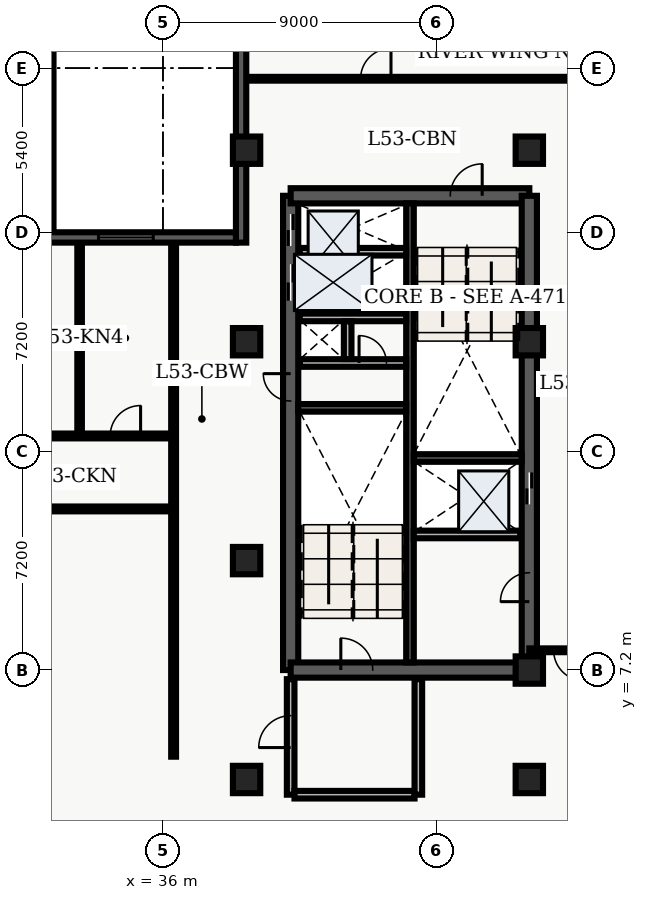
"""IFC4 building model, lengths in metres.
Left out: names, types, materials, properties, quantities, classifications, styles, units other than length and angle.
Written with IfcOpenShell. Run it as: python <this file> out.ifc"""

import sys

from ifc_helpers import new_model, entity, si_unit, converted_unit, direction, frame, origin_with_axes, origin_2d_with_axis, place, context, subcontext, project, spatial, polyline, rectangle, outline, extrude, element, fill, save


model = new_model("IFC4")
c1 = context("Model", 3, precision=1e-05, world=origin_with_axes(), true_north=direction((0.0, 1.0)))
c2 = subcontext(c1, "Body", "Model", "MODEL_VIEW")
j1 = project(units=[si_unit("LENGTHUNIT", "METRE"), converted_unit("PLANEANGLEUNIT", "DEGREE", entity("IfcPlaneAngleMeasure", 0.017), si_unit("PLANEANGLEUNIT", "RADIAN"), dimensions=[0, 0, 0, 0, 0, 0, 0])], contexts=[c1])
p1 = place(None, origin_with_axes())
s1 = spatial("IfcSite", under=j1, at=p1, CompositionType="ELEMENT")
p2 = place(p1, origin_with_axes())
s2 = spatial("IfcBuilding", under=s1, at=p2, CompositionType="ELEMENT")
p3 = place(p2, frame((0.0, 0.0, 216.0), z_axis=(0.0, 0.0, 1.0), x_axis=(1.0, 0.0, 0.0)))
s3 = spatial("IfcBuildingStorey", under=s2, at=p3, CompositionType="ELEMENT", Elevation=216.0)
p4 = place(p3, frame((40.2, 7.2, 0.0), z_axis=(0.0, 0.0, 1.0), x_axis=(0.0, 1.0, 0.0)))
e1 = element("IfcWall", 1, at=p4, inside=s3, PredefinedType="SHEAR", context=c2, shape_type="SweptSolid", body=[
    extrude(outline(polyline([(0.0, -0.25), (15.6, -0.25), (15.6, 0.25), (0.0, 0.25), (0.0, -0.25)])), origin_with_axes(), (0.0, 0.0, 1.0), 3.6),
])
p5 = place(p4, frame((14.475, 0.0, 0.0), z_axis=(0.0, 0.0, 1.0), x_axis=(1.0, 0.0, 0.0)))
e2 = element("IfcOpeningElement", 2, at=p5, cuts=e1, PredefinedType="OPENING", context=c2, shape_type="SweptSolid", body=[
    extrude(rectangle(XDim=1.05, YDim=0.52, at=origin_2d_with_axis()), origin_with_axes(), (0.0, 0.0, 1.0), 2.15),
])
p6 = place(p4, frame((12.75, 0.0, 0.0), z_axis=(0.0, 0.0, 1.0), x_axis=(1.0, 0.0, 0.0)))
e3 = element("IfcOpeningElement", 3, at=p6, cuts=e1, PredefinedType="OPENING", context=c2, shape_type="SweptSolid", body=[
    extrude(rectangle(XDim=1.2, YDim=0.52, at=origin_2d_with_axis()), origin_with_axes(), (0.0, 0.0, 1.0), 2.15),
])
p7 = place(p4, frame((9.3, 0.0, 0.0), z_axis=(0.0, 0.0, 1.0), x_axis=(1.0, 0.0, 0.0)))
e4 = element("IfcOpeningElement", 4, at=p7, cuts=e1, PredefinedType="OPENING", context=c2, shape_type="SweptSolid", body=[
    extrude(rectangle(XDim=0.9, YDim=0.52, at=origin_2d_with_axis()), origin_with_axes(), (0.0, 0.0, 1.0), 2.15),
])
p8 = place(p3, frame((40.2, 7.2, 0.0), z_axis=(0.0, 0.0, 1.0), x_axis=(1.0, 0.0, 0.0)))
e5 = element("IfcWall", 5, at=p8, inside=s3, PredefinedType="SHEAR", context=c2, shape_type="SweptSolid", body=[
    extrude(outline(polyline([(0.0, -0.25), (7.85, -0.25), (7.85, 0.25), (0.0, 0.25), (0.0, -0.25)])), origin_with_axes(), (0.0, 0.0, 1.0), 3.6),
])
p9 = place(p8, frame((2.175, 0.0, 0.0), z_axis=(0.0, 0.0, 1.0), x_axis=(1.0, 0.0, 0.0)))
e6 = element("IfcOpeningElement", 6, at=p9, cuts=e5, PredefinedType="OPENING", context=c2, shape_type="SweptSolid", body=[
    extrude(rectangle(XDim=1.05, YDim=0.52, at=origin_2d_with_axis()), origin_with_axes(), (0.0, 0.0, 1.0), 2.15),
])
p10 = place(p3, frame((40.2, 22.8, 0.0), z_axis=(0.0, 0.0, 1.0), x_axis=(1.0, 0.0, 0.0)))
e7 = element("IfcWall", 7, at=p10, inside=s3, PredefinedType="SHEAR", context=c2, shape_type="SweptSolid", body=[
    extrude(outline(polyline([(0.0, -0.25), (7.85, -0.25), (7.85, 0.25), (0.0, 0.25), (0.0, -0.25)])), origin_with_axes(), (0.0, 0.0, 1.0), 3.6),
])
p11 = place(p10, frame((5.775, 0.0, 0.0), z_axis=(0.0, 0.0, 1.0), x_axis=(1.0, 0.0, 0.0)))
e8 = element("IfcOpeningElement", 8, at=p11, cuts=e7, PredefinedType="OPENING", context=c2, shape_type="SweptSolid", body=[
    extrude(rectangle(XDim=1.05, YDim=0.52, at=origin_2d_with_axis()), origin_with_axes(), (0.0, 0.0, 1.0), 2.15),
])
p12 = place(p3, frame((48.05, 7.2, 0.0), z_axis=(0.0, 0.0, 1.0), x_axis=(0.0, 1.0, 0.0)))
e9 = element("IfcWall", 9, at=p12, inside=s3, PredefinedType="SHEAR", context=c2, shape_type="SweptSolid", body=[
    extrude(outline(polyline([(0.0, -0.25), (15.6, -0.25), (15.6, 0.25), (0.0, 0.25), (0.0, -0.25)])), origin_with_axes(), (0.0, 0.0, 1.0), 3.6),
])
p13 = place(p12, frame((5.975, 0.0, 0.0), z_axis=(0.0, 0.0, 1.0), x_axis=(1.0, 0.0, 0.0)))
e10 = element("IfcOpeningElement", 10, at=p13, cuts=e9, PredefinedType="OPENING", context=c2, shape_type="SweptSolid", body=[
    extrude(rectangle(XDim=1.05, YDim=0.52, at=origin_2d_with_axis()), origin_with_axes(), (0.0, 0.0, 1.0), 2.15),
])
p14 = place(p12, frame((2.725, 0.0, 0.0), z_axis=(0.0, 0.0, 1.0), x_axis=(1.0, 0.0, 0.0)))
e11 = element("IfcOpeningElement", 11, at=p14, cuts=e9, PredefinedType="OPENING", context=c2, shape_type="SweptSolid", body=[
    extrude(rectangle(XDim=0.95, YDim=0.52, at=origin_2d_with_axis()), origin_with_axes(), (0.0, 0.0, 1.0), 2.15),
])
p15 = place(p3, frame((44.125, 7.45, 0.0), z_axis=(0.0, 0.0, 1.0), x_axis=(0.0, 1.0, 0.0)))
e12 = element("IfcWall", 12, at=p15, inside=s3, PredefinedType="SHEAR", context=c2, shape_type="SweptSolid", body=[
    extrude(outline(polyline([(0.0, -0.125), (15.1, -0.125), (15.1, 0.125), (0.0, 0.125), (0.0, -0.125)])), origin_with_axes(), (0.0, 0.0, 1.0), 3.6),
])
for number, where, z_axis, x_axis in (
    (13, (40.45, 15.825, 0.0), (0.0, 0.0, 1.0), (1.0, 0.0, 0.0)),
    (14, (44.25, 14.175, 0.0), (0.0, 0.0, 1.0), (1.0, 0.0, 0.0)),
):
    element("IfcWall", number, at=place(p3, frame(where, z_axis=z_axis, x_axis=x_axis)), inside=s3, PredefinedType="SHEAR", context=c2, shape_type="SweptSolid", body=[
        extrude(outline(polyline([(0.0, -0.125), (3.55, -0.125), (3.55, 0.125), (0.0, 0.125), (0.0, -0.125)])), origin_with_axes(), (0.0, 0.0, 1.0), 3.6),
    ])
p16 = place(p3, frame((40.5, 17.3, 0.0), z_axis=(0.0, 0.0, 1.0), x_axis=(1.0, 0.0, 0.0)))
e15 = element("IfcWall", 15, at=p16, inside=s3, PredefinedType="SOLIDWALL", context=c2, shape_type="SweptSolid", body=[
    extrude(outline(polyline([(0.0, -0.125), (3.5, -0.125), (3.5, 0.125), (0.0, 0.125), (0.0, -0.125)])), origin_with_axes(), (0.0, 0.0, 1.0), 2.64),
])
p17 = place(p16, frame((2.4, 0.0, 0.0), z_axis=(0.0, 0.0, 1.0), x_axis=(1.0, 0.0, 0.0)))
e16 = element("IfcOpeningElement", 16, at=p17, cuts=e15, PredefinedType="OPENING", context=c2, shape_type="SweptSolid", body=[
    extrude(rectangle(XDim=0.9, YDim=0.27, at=origin_2d_with_axis()), origin_with_axes(), (0.0, 0.0, 1.0), 2.15),
])
p18 = place(p3, frame((40.5, 18.8, 0.0), z_axis=(0.0, 0.0, 1.0), x_axis=(1.0, 0.0, 0.0)))
e17 = element("IfcWall", 17, at=p18, inside=s3, PredefinedType="SOLIDWALL", context=c2, shape_type="SweptSolid", body=[
    extrude(outline(polyline([(0.0, -0.125), (3.5, -0.125), (3.5, 0.125), (0.0, 0.125), (0.0, -0.125)])), origin_with_axes(), (0.0, 0.0, 1.0), 2.64),
])
p19 = place(p3, frame((42.075, 17.43, 0.0), z_axis=(0.0, 0.0, 1.0), x_axis=(0.0, 1.0, 0.0)))
e18 = element("IfcWall", 18, at=p19, inside=s3, PredefinedType="SOLIDWALL", context=c2, shape_type="SweptSolid", body=[
    extrude(outline(polyline([(0.0, -0.125), (1.24, -0.125), (1.24, 0.125), (0.0, 0.125), (0.0, -0.125)])), origin_with_axes(), (0.0, 0.0, 1.0), 2.64),
])
p20 = place(p3, frame((40.2, 3.1, 0.0), z_axis=(0.0, 0.0, 1.0), x_axis=(0.0, 1.0, 0.0)))
e19 = element("IfcWall", 19, at=p20, inside=s3, PredefinedType="SOLIDWALL", context=c2, shape_type="SweptSolid", body=[
    extrude(outline(polyline([(0.0, -0.125), (3.8, -0.125), (3.8, 0.125), (0.0, 0.125), (0.0, -0.125)])), origin_with_axes(), (0.0, 0.0, 1.0), 2.64),
])
p21 = place(p20, frame((2.075, 0.0, 0.0), z_axis=(0.0, 0.0, 1.0), x_axis=(1.0, 0.0, 0.0)))
e20 = element("IfcOpeningElement", 20, at=p21, cuts=e19, PredefinedType="OPENING", context=c2, shape_type="SweptSolid", body=[
    extrude(rectangle(XDim=1.05, YDim=0.27, at=origin_2d_with_axis()), origin_with_axes(), (0.0, 0.0, 1.0), 2.15),
])
p22 = place(p3, frame((40.325, 3.1, 0.0), z_axis=(0.0, 0.0, 1.0), x_axis=(1.0, 0.0, 0.0)))
e21 = element("IfcWall", 21, at=p22, inside=s3, PredefinedType="SOLIDWALL", context=c2, shape_type="SweptSolid", body=[
    extrude(outline(polyline([(0.0, -0.125), (3.95, -0.125), (3.95, 0.125), (0.0, 0.125), (0.0, -0.125)])), origin_with_axes(), (0.0, 0.0, 1.0), 2.64),
])
p23 = place(p3, frame((44.4, 3.1, 0.0), z_axis=(0.0, 0.0, 1.0), x_axis=(0.0, 1.0, 0.0)))
e22 = element("IfcWall", 22, at=p23, inside=s3, PredefinedType="SOLIDWALL", context=c2, shape_type="SweptSolid", body=[
    extrude(outline(polyline([(0.0, -0.125), (3.8, -0.125), (3.8, 0.125), (0.0, 0.125), (0.0, -0.125)])), origin_with_axes(), (0.0, 0.0, 1.0), 2.64),
])
for number, where, z_axis, x_axis in (
    (23, (38.75, 3.6, 0.0), (0.0, 0.0, 1.0), (1.0, 0.0, 0.0)),
    (24, (38.75, 10.8, 0.0), (0.0, 0.0, 1.0), (1.0, 0.0, 0.0)),
    (25, (38.75, 18.0, 0.0), (0.0, 0.0, 1.0), (1.0, 0.0, 0.0)),
    (26, (38.75, 24.3, 0.0), (0.0, 0.0, 1.0), (1.0, 0.0, 0.0)),
    (27, (48.05, 3.6, 0.0), (0.0, 0.0, 1.0), (1.0, 0.0, 0.0)),
    (28, (48.05, 7.2, 0.0), (0.0, 0.0, 1.0), (1.0, 0.0, 0.0)),
    (29, (48.05, 18.0, 0.0), (0.0, 0.0, 1.0), (1.0, 0.0, 0.0)),
    (30, (48.05, 24.3, 0.0), (0.0, 0.0, 1.0), (1.0, 0.0, 0.0)),
):
    element("IfcColumn", number, at=place(p3, frame(where, z_axis=z_axis, x_axis=x_axis)), inside=s3, PredefinedType="COLUMN", context=c2, shape_type="SweptSolid", body=[
        extrude(rectangle(XDim=0.9, YDim=0.9, at=origin_2d_with_axis()), origin_with_axes(), (0.0, 0.0, 1.0), 3.9),
    ])
for number, where, z_axis, x_axis in (
    (31, (40.5, 20.96, 0.0), (0.0, 0.0, 1.0), (1.0, 0.0, 0.0)),
    (32, (44.25, 11.66, 0.0), (0.0, 0.0, 1.0), (1.0, 0.0, 0.0)),
):
    element("IfcWall", number, at=place(p3, frame(where, z_axis=z_axis, x_axis=x_axis)), inside=s3, PredefinedType="SOLIDWALL", context=c2, shape_type="SweptSolid", body=[
        extrude(outline(polyline([(0.0, -0.125), (3.5, -0.125), (3.5, 0.125), (0.0, 0.125), (0.0, -0.125)])), origin_with_axes(), (0.0, 0.0, 1.0), 2.64),
    ])
p24 = place(p3, frame((21.15, 12.5, 0.0), z_axis=(0.0, 0.0, 1.0), x_axis=(1.0, 0.0, 0.0)))
e33 = element("IfcWall", 33, at=p24, inside=s3, PredefinedType="PARTITIONING", context=c2, shape_type="SweptSolid", body=[
    extrude(outline(polyline([(0.0, -0.08), (15.2, -0.08), (15.2, 0.08), (0.0, 0.08), (0.0, -0.08)])), origin_with_axes(), (0.0, 0.0, 1.0), 2.64),
])
p25 = place(p24, frame((7.65, 0.0, 0.0), z_axis=(0.0, 0.0, 1.0), x_axis=(1.0, 0.0, 0.0)))
e34 = element("IfcOpeningElement", 34, at=p25, cuts=e33, PredefinedType="OPENING", context=c2, shape_type="SweptSolid", body=[
    extrude(rectangle(XDim=1.2, YDim=0.18, at=origin_2d_with_axis()), origin_with_axes(), (0.0, 0.0, 1.0), 2.2),
])
p26 = place(p3, frame((21.15, 14.9, 0.0), z_axis=(0.0, 0.0, 1.0), x_axis=(1.0, 0.0, 0.0)))
e35 = element("IfcWall", 35, at=p26, inside=s3, PredefinedType="PARTITIONING", context=c2, shape_type="SweptSolid", body=[
    extrude(outline(polyline([(0.0, -0.08), (15.2, -0.08), (15.2, 0.08), (0.0, 0.08), (0.0, -0.08)])), origin_with_axes(), (0.0, 0.0, 1.0), 2.64),
])
p27 = place(p26, frame((1.964, 0.0, 0.0), z_axis=(0.0, 0.0, 1.0), x_axis=(1.0, 0.0, 0.0)))
e36 = element("IfcOpeningElement", 36, at=p27, cuts=e35, PredefinedType="OPENING", context=c2, shape_type="SweptSolid", body=[
    extrude(rectangle(XDim=1.0, YDim=0.18, at=origin_2d_with_axis()), origin_with_axes(), (0.0, 0.0, 1.0), 2.15),
])
p28 = place(p26, frame((5.099, 0.0, 0.0), z_axis=(0.0, 0.0, 1.0), x_axis=(1.0, 0.0, 0.0)))
e37 = element("IfcOpeningElement", 37, at=p28, cuts=e35, PredefinedType="OPENING", context=c2, shape_type="SweptSolid", body=[
    extrude(rectangle(XDim=1.0, YDim=0.18, at=origin_2d_with_axis()), origin_with_axes(), (0.0, 0.0, 1.0), 2.15),
])
p29 = place(p26, frame((9.279, 0.0, 0.0), z_axis=(0.0, 0.0, 1.0), x_axis=(1.0, 0.0, 0.0)))
e38 = element("IfcOpeningElement", 38, at=p29, cuts=e35, PredefinedType="OPENING", context=c2, shape_type="SweptSolid", body=[
    extrude(rectangle(XDim=1.0, YDim=0.18, at=origin_2d_with_axis()), origin_with_axes(), (0.0, 0.0, 1.0), 2.15),
])
p30 = place(p26, frame((13.614, 0.0, 0.0), z_axis=(0.0, 0.0, 1.0), x_axis=(1.0, 0.0, 0.0)))
e39 = element("IfcOpeningElement", 39, at=p30, cuts=e35, PredefinedType="OPENING", context=c2, shape_type="SweptSolid", body=[
    extrude(rectangle(XDim=1.0, YDim=0.18, at=origin_2d_with_axis()), origin_with_axes(), (0.0, 0.0, 1.0), 2.15),
])
p31 = place(p3, frame((36.35, 4.35, 0.0), z_axis=(0.0, 0.0, 1.0), x_axis=(0.0, 1.0, 0.0)))
e40 = element("IfcWall", 40, at=p31, inside=s3, PredefinedType="PARTITIONING", context=c2, shape_type="SweptSolid", body=[
    extrude(outline(polyline([(0.0, -0.08), (16.95, -0.08), (16.95, 0.08), (0.0, 0.08), (0.0, -0.08)])), origin_with_axes(), (0.0, 0.0, 1.0), 2.64),
])
p32 = place(p3, frame((33.258, 15.02, 0.0), z_axis=(0.0, 0.0, 1.0), x_axis=(0.0, 1.0, 0.0)))
e41 = element("IfcWall", 41, at=p32, inside=s3, PredefinedType="PARTITIONING", context=c2, shape_type="SweptSolid", body=[
    extrude(outline(polyline([(0.0, -0.075), (6.245, -0.075), (6.245, 0.075), (0.0, 0.075), (0.0, -0.075)])), origin_with_axes(), (0.0, 0.0, 1.0), 2.64),
])
p33 = place(p3, frame((59.665, 7.85, 0.0), z_axis=(0.0, 0.0, 1.0), x_axis=(-1.0, 0.0, 0.0)))
e42 = element("IfcWall", 42, at=p33, inside=s3, PredefinedType="PARTITIONING", context=c2, shape_type="SweptSolid", body=[
    extrude(outline(polyline([(0.0, -0.062), (11.615, -0.062), (11.615, 0.062), (0.0, 0.062), (0.0, -0.062)])), origin_with_axes(), (0.0, 0.0, 1.0), 2.64),
])
p34 = place(p33, frame((10.315, 0.0, 0.0), z_axis=(0.0, 0.0, 1.0), x_axis=(1.0, 0.0, 0.0)))
e43 = element("IfcOpeningElement", 43, at=p34, cuts=e42, PredefinedType="OPENING", context=c2, shape_type="SweptSolid", body=[
    extrude(rectangle(XDim=1.0, YDim=0.145, at=origin_2d_with_axis()), origin_with_axes(), (0.0, 0.0, 1.0), 2.15),
])
p35 = place(p3, frame((38.735, 26.65, 0.0), z_axis=(0.0, 0.0, 1.0), x_axis=(1.0, 0.0, 0.0)))
e44 = element("IfcWall", 44, at=p35, inside=s3, PredefinedType="PARTITIONING", context=c2, shape_type="SweptSolid", body=[
    extrude(outline(polyline([(0.0, -0.062), (20.905, -0.062), (20.905, 0.062), (0.0, 0.062), (0.0, -0.062)])), origin_with_axes(), (0.0, 0.0, 1.0), 2.64),
])
p36 = place(p35, frame((4.265, 0.0, 0.0), z_axis=(0.0, 0.0, 1.0), x_axis=(1.0, 0.0, 0.0)))
e45 = element("IfcOpeningElement", 45, at=p36, cuts=e44, PredefinedType="OPENING", context=c2, shape_type="SweptSolid", body=[
    extrude(rectangle(XDim=1.0, YDim=0.145, at=origin_2d_with_axis()), origin_with_axes(), (0.0, 0.0, 1.0), 2.15),
])
p37 = place(p3, frame((38.57, 21.26, 0.0), z_axis=(0.0, 0.0, 1.0), x_axis=(0.0, 1.0, 0.0)))
e46 = element("IfcWall", 46, at=p37, inside=s3, PredefinedType="SOLIDWALL", context=c2, shape_type="SweptSolid", body=[
    extrude(outline(polyline([(0.0, -0.17), (7.54, -0.17), (7.54, 0.17), (0.0, 0.17), (0.0, -0.17)])), origin_with_axes(), (0.0, 0.0, 1.0), 3.6),
])
p38 = place(p3, frame((32.23, 41.22, 0.0), z_axis=(0.0, 0.0, 1.0), x_axis=(0.0, -1.0, 0.0)))
e47 = element("IfcWall", 47, at=p38, inside=s3, PredefinedType="SOLIDWALL", context=c2, shape_type="SweptSolid", body=[
    extrude(outline(polyline([(0.0, -0.17), (19.62, -0.17), (19.62, 0.17), (0.0, 0.17), (0.0, -0.17)])), origin_with_axes(), (0.0, 0.0, 1.0), 3.6),
])
p39 = place(p38, frame((2.903, 0.0, 0.45), z_axis=(0.0, 0.0, 1.0), x_axis=(1.0, 0.0, 0.0)))
e48 = element("IfcOpeningElement", 48, at=p39, cuts=e47, PredefinedType="OPENING", context=c2, shape_type="SweptSolid", body=[
    extrude(rectangle(XDim=1.6, YDim=0.36, at=origin_2d_with_axis()), origin_with_axes(), (0.0, 0.0, 1.0), 2.2),
])
p40 = place(p38, frame((6.657, 0.0, 0.45), z_axis=(0.0, 0.0, 1.0), x_axis=(1.0, 0.0, 0.0)))
e49 = element("IfcOpeningElement", 49, at=p40, cuts=e47, PredefinedType="OPENING", context=c2, shape_type="SweptSolid", body=[
    extrude(rectangle(XDim=1.6, YDim=0.36, at=origin_2d_with_axis()), origin_with_axes(), (0.0, 0.0, 1.0), 2.2),
])
p41 = place(p38, frame((12.112, 0.0, 0.45), z_axis=(0.0, 0.0, 1.0), x_axis=(1.0, 0.0, 0.0)))
e50 = element("IfcOpeningElement", 50, at=p41, cuts=e47, PredefinedType="OPENING", context=c2, shape_type="SweptSolid", body=[
    extrude(rectangle(XDim=1.6, YDim=0.36, at=origin_2d_with_axis()), origin_with_axes(), (0.0, 0.0, 1.0), 2.2),
])
p42 = place(p38, frame((16.718, 0.0, 0.45), z_axis=(0.0, 0.0, 1.0), x_axis=(1.0, 0.0, 0.0)))
e51 = element("IfcOpeningElement", 51, at=p42, cuts=e47, PredefinedType="OPENING", context=c2, shape_type="SweptSolid", body=[
    extrude(rectangle(XDim=1.6, YDim=0.36, at=origin_2d_with_axis()), origin_with_axes(), (0.0, 0.0, 1.0), 2.2),
])
p43 = place(p3, frame((32.06, 21.43, 0.0), z_axis=(0.0, 0.0, 1.0), x_axis=(1.0, 0.0, 0.0)))
e52 = element("IfcWall", 52, at=p43, inside=s3, PredefinedType="SOLIDWALL", context=c2, shape_type="SweptSolid", body=[
    extrude(outline(polyline([(0.0, -0.17), (6.34, -0.17), (6.34, 0.17), (0.0, 0.17), (0.0, -0.17)])), origin_with_axes(), (0.0, 0.0, 1.0), 3.6),
])
p44 = place(p43, frame((2.72, 0.0, 0.45), z_axis=(0.0, 0.0, 1.0), x_axis=(1.0, 0.0, 0.0)))
e53 = element("IfcOpeningElement", 53, at=p44, cuts=e52, PredefinedType="OPENING", context=c2, shape_type="SweptSolid", body=[
    extrude(rectangle(XDim=1.8, YDim=0.36, at=origin_2d_with_axis()), origin_with_axes(), (0.0, 0.0, 1.0), 2.1),
])
p45 = place(p12, frame((5.975, 0.0, 0.0), z_axis=(0.0, 0.0, 1.0), x_axis=(1.0, 0.0, 0.0)))
e54 = element("IfcDoor", 54, at=p45, inside=s3, OperationType="SLIDING_TO_LEFT", PredefinedType="DOOR", context=c2, shape_type="SweptSolid", body=[
    extrude(rectangle(XDim=1.05, YDim=0.09, at=origin_2d_with_axis()), origin_with_axes(), (0.0, 0.0, 1.0), 2.15),
])
fill(e10, e54)
p46 = place(p4, frame((14.475, 0.0, 0.0), z_axis=(0.0, 0.0, 1.0), x_axis=(1.0, 0.0, 0.0)))
e55 = element("IfcDoor", 55, at=p46, inside=s3, OperationType="SLIDING_TO_RIGHT", PredefinedType="DOOR", context=c2, shape_type="SweptSolid", body=[
    extrude(rectangle(XDim=1.05, YDim=0.09, at=origin_2d_with_axis()), origin_with_axes(), (0.0, 0.0, 1.0), 2.15),
])
fill(e2, e55)
p47 = place(p4, frame((12.75, 0.0, 0.0), z_axis=(0.0, 0.0, 1.0), x_axis=(1.0, 0.0, 0.0)))
e56 = element("IfcDoor", 56, at=p47, inside=s3, OperationType="DOUBLE_DOOR_SLIDING", PredefinedType="DOOR", context=c2, shape_type="SweptSolid", body=[
    extrude(rectangle(XDim=1.2, YDim=0.09, at=origin_2d_with_axis()), origin_with_axes(), (0.0, 0.0, 1.0), 2.15),
])
fill(e3, e56)
p48 = place(p4, frame((9.3, 0.0, 0.0), z_axis=(0.0, 0.0, 1.0), x_axis=(1.0, 0.0, 0.0)))
e57 = element("IfcDoor", 57, at=p48, inside=s3, OperationType="SINGLE_SWING_RIGHT", PredefinedType="DOOR", context=c2, shape_type="SweptSolid", body=[
    extrude(rectangle(XDim=0.9, YDim=0.09, at=origin_2d_with_axis()), origin_with_axes(), (0.0, 0.0, 1.0), 2.15),
])
fill(e4, e57)
p49 = place(p16, frame((2.4, 0.0, 0.0), z_axis=(0.0, 0.0, 1.0), x_axis=(1.0, 0.0, 0.0)))
e58 = element("IfcDoor", 58, at=p49, inside=s3, OperationType="SINGLE_SWING_LEFT", PredefinedType="DOOR", context=c2, shape_type="SweptSolid", body=[
    extrude(rectangle(XDim=0.9, YDim=0.09, at=origin_2d_with_axis()), origin_with_axes(), (0.0, 0.0, 1.0), 2.15),
])
fill(e16, e58)
p50 = place(p8, frame((2.175, 0.0, 0.0), z_axis=(0.0, 0.0, 1.0), x_axis=(1.0, 0.0, 0.0)))
e59 = element("IfcDoor", 59, at=p50, inside=s3, OperationType="SINGLE_SWING_LEFT", PredefinedType="DOOR", context=c2, shape_type="SweptSolid", body=[
    extrude(rectangle(XDim=1.05, YDim=0.09, at=origin_2d_with_axis()), origin_with_axes(), (0.0, 0.0, 1.0), 2.15),
])
fill(e6, e59)
p51 = place(p10, frame((5.775, 0.0, 0.0), z_axis=(0.0, 0.0, 1.0), x_axis=(1.0, 0.0, 0.0)))
e60 = element("IfcDoor", 60, at=p51, inside=s3, OperationType="SINGLE_SWING_RIGHT", PredefinedType="DOOR", context=c2, shape_type="SweptSolid", body=[
    extrude(rectangle(XDim=1.05, YDim=0.09, at=origin_2d_with_axis()), origin_with_axes(), (0.0, 0.0, 1.0), 2.15),
])
fill(e8, e60)
p52 = place(p20, frame((2.075, 0.0, 0.0), z_axis=(0.0, 0.0, 1.0), x_axis=(1.0, 0.0, 0.0)))
e61 = element("IfcDoor", 61, at=p52, inside=s3, OperationType="SINGLE_SWING_LEFT", PredefinedType="DOOR", context=c2, shape_type="SweptSolid", body=[
    extrude(rectangle(XDim=1.05, YDim=0.09, at=origin_2d_with_axis()), origin_with_axes(), (0.0, 0.0, 1.0), 2.15),
])
fill(e20, e61)
p53 = place(p12, frame((2.725, 0.0, 0.0), z_axis=(0.0, 0.0, 1.0), x_axis=(1.0, 0.0, 0.0)))
e62 = element("IfcDoor", 62, at=p53, inside=s3, OperationType="SINGLE_SWING_LEFT", PredefinedType="DOOR", context=c2, shape_type="SweptSolid", body=[
    extrude(rectangle(XDim=0.95, YDim=0.09, at=origin_2d_with_axis()), origin_with_axes(), (0.0, 0.0, 1.0), 2.15),
])
fill(e11, e62)
p54 = place(p26, frame((13.614, 0.0, 0.0), z_axis=(0.0, 0.0, 1.0), x_axis=(1.0, 0.0, 0.0)))
e63 = element("IfcDoor", 63, at=p54, inside=s3, OperationType="SINGLE_SWING_RIGHT", PredefinedType="DOOR", context=c2, shape_type="SweptSolid", body=[
    extrude(rectangle(XDim=1.0, YDim=0.09, at=origin_2d_with_axis()), origin_with_axes(), (0.0, 0.0, 1.0), 2.15),
])
fill(e39, e63)
p55 = place(p33, frame((10.315, 0.0, 0.0), z_axis=(0.0, 0.0, 1.0), x_axis=(1.0, 0.0, 0.0)))
e64 = element("IfcDoor", 64, at=p55, inside=s3, OperationType="SINGLE_SWING_LEFT", PredefinedType="DOOR", context=c2, shape_type="SweptSolid", body=[
    extrude(rectangle(XDim=1.0, YDim=0.075, at=origin_2d_with_axis()), origin_with_axes(), (0.0, 0.0, 1.0), 2.15),
])
fill(e43, e64)
p56 = place(p35, frame((4.265, 0.0, 0.0), z_axis=(0.0, 0.0, 1.0), x_axis=(1.0, 0.0, 0.0)))
e65 = element("IfcDoor", 65, at=p56, inside=s3, OperationType="SINGLE_SWING_RIGHT", PredefinedType="DOOR", context=c2, shape_type="SweptSolid", body=[
    extrude(rectangle(XDim=1.0, YDim=0.075, at=origin_2d_with_axis()), origin_with_axes(), (0.0, 0.0, 1.0), 2.15),
])
fill(e45, e65)
p57 = place(p43, frame((2.72, 0.0, 0.45), z_axis=(0.0, 0.0, 1.0), x_axis=(1.0, 0.0, 0.0)))
e66 = element("IfcWindow", 66, at=p57, inside=s3, PredefinedType="WINDOW", context=c2, shape_type="SweptSolid", body=[
    extrude(rectangle(XDim=1.8, YDim=0.09, at=origin_2d_with_axis()), origin_with_axes(), (0.0, 0.0, 1.0), 2.1),
])
fill(e53, e66)
save(model, sys.argv[1])
